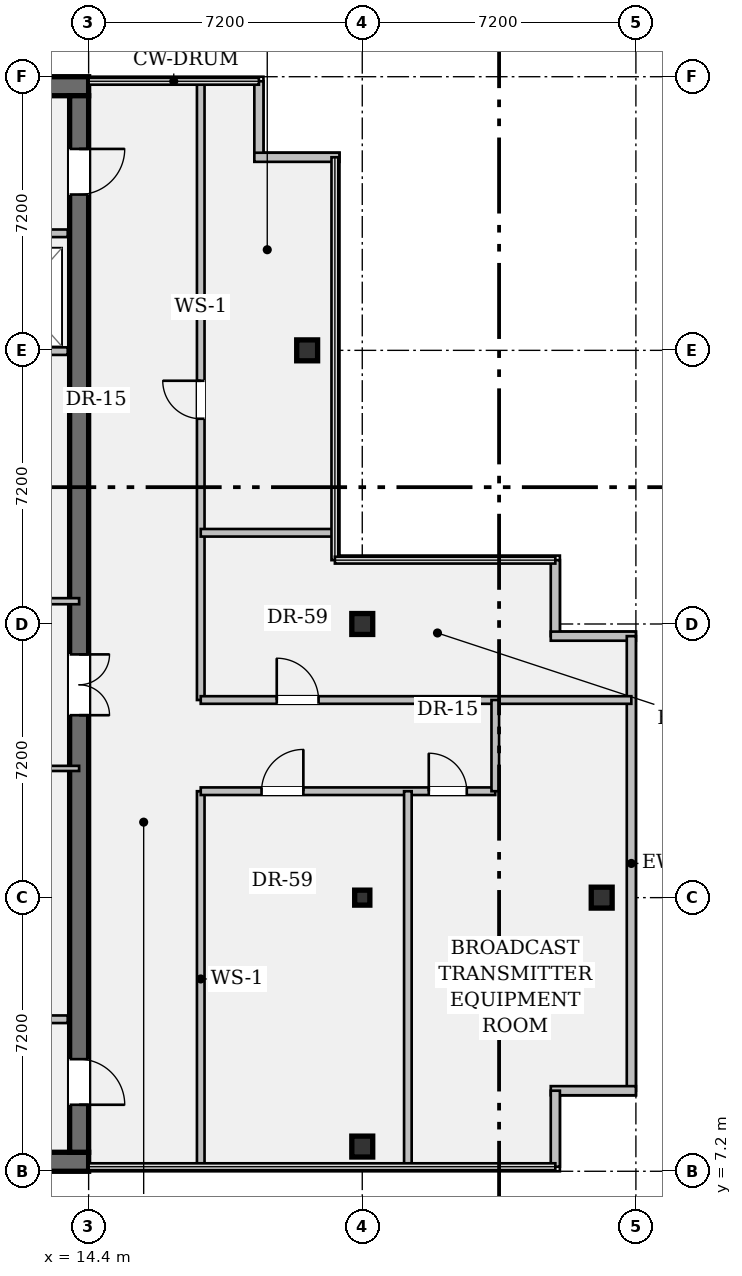
"""IFC4 building model, lengths in metres.
Left out: names, types, materials, properties, quantities, classifications, styles, units other than length and angle.
Written with IfcOpenShell. Run it as: python <this file> out.ifc"""

import sys

from ifc_helpers import new_model, si_unit, direction, frame, frame_2d, origin, origin_2d, place, context, subcontext, project, spatial, rectangle, hollow_rectangle, i_section, extrude, element, fill, save


model = new_model("IFC4")
c1 = context("Model", 3, precision=1e-05, world=origin(), true_north=direction((0.0, 1.0)))
c2 = subcontext(c1, "Body", "Model", "MODEL_VIEW")
j1 = project(units=[si_unit("LENGTHUNIT", "METRE"), si_unit("PLANEANGLEUNIT", "RADIAN")], contexts=[c1])
p1 = place(None, origin())
s1 = spatial("IfcSite", under=j1, at=p1, CompositionType="ELEMENT")
p2 = place(p1, origin())
s2 = spatial("IfcBuilding", under=s1, at=p2, CompositionType="ELEMENT")
p3 = place(p2, frame((0.0, 0.0, 301.35)))
s3 = spatial("IfcBuildingStorey", under=s2, at=p3, CompositionType="ELEMENT", Elevation=301.35)
for number, where, z_axis, x_axis in (
    (1, (0.5, 7.45, 0.0), (0.0, 0.0, 1.0), (1.0, 0.0, 0.0)),
    (2, (0.5, 35.75, 0.0), (0.0, 0.0, 1.0), (1.0, 0.0, 0.0)),
):
    element("IfcWall", number, at=place(p3, frame(where, z_axis=z_axis, x_axis=x_axis)), inside=s3, PredefinedType="SHEAR", context=c2, shape_type="SweptSolid", body=[
        extrude(rectangle(XDim=13.9, YDim=0.5, at=frame_2d((6.95, 0.0))), origin(), (0.0, 0.0, 1.0), 3.5),
    ])
p4 = place(p3, frame((14.15, 35.5, 0.0), z_axis=(0.0, 0.0, 1.0), x_axis=(0.0, -1.0, 0.0)))
e3 = element("IfcWall", 3, at=p4, inside=s3, PredefinedType="SHEAR", context=c2, shape_type="SweptSolid", body=[
    extrude(rectangle(XDim=27.8, YDim=0.5, at=frame_2d((13.9, 0.0))), origin(), (0.0, 0.0, 1.0), 3.5),
])
p5 = place(p4, frame((1.4, 0.0, 0.0)))
e4 = element("IfcOpeningElement", 4, at=p5, cuts=e3, PredefinedType="OPENING", context=c2, shape_type="SweptSolid", body=[
    extrude(rectangle(XDim=1.2, YDim=2.15, at=frame_2d((0.6, 1.075))), frame((0.0, 0.262, 0.0), z_axis=(0.0, -1.0, 0.0), x_axis=(1.0, 0.0, 0.0)), (0.0, 0.0, 1.0), 0.524),
])
p6 = place(p4, frame((25.35, 0.0, 0.0)))
e5 = element("IfcOpeningElement", 5, at=p6, cuts=e3, PredefinedType="OPENING", context=c2, shape_type="SweptSolid", body=[
    extrude(rectangle(XDim=1.2, YDim=2.15, at=frame_2d((0.6, 1.075))), frame((0.0, 0.262, 0.0), z_axis=(0.0, -1.0, 0.0), x_axis=(1.0, 0.0, 0.0)), (0.0, 0.0, 1.0), 0.524),
])
p7 = place(p4, frame((14.7, 0.0, 0.0)))
e6 = element("IfcOpeningElement", 6, at=p7, cuts=e3, PredefinedType="OPENING", context=c2, shape_type="SweptSolid", body=[
    extrude(rectangle(XDim=1.6, YDim=2.2, at=frame_2d((0.8, 1.1))), frame((0.0, 0.262, 0.0), z_axis=(0.0, -1.0, 0.0), x_axis=(1.0, 0.0, 0.0)), (0.0, 0.0, 1.0), 0.524),
])
for number, where, z_axis, x_axis in (
    (7, (20.15, 28.8, 0.0), (0.0, 0.0, 1.0), (1.0, 0.0, 0.0)),
    (8, (21.6, 7.85, 0.0), (0.0, 0.0, 1.0), (1.0, 0.0, 0.0)),
):
    element("IfcColumn", number, at=place(p3, frame(where, z_axis=z_axis, x_axis=x_axis)), inside=s3, PredefinedType="COLUMN", context=c2, shape_type="SweptSolid", body=[
        extrude(hollow_rectangle(XDim=0.55, YDim=0.55, WallThickness=0.035, at=origin_2d()), origin(), (0.0, 0.0, 1.0), 3.5),
    ])
p8 = place(p3, frame((21.6, 14.4, 0.0), z_axis=(0.0, 0.0, 1.0), x_axis=(1.0, 0.0, 0.0)))
e9 = element("IfcColumn", 9, at=p8, inside=s3, PredefinedType="COLUMN", context=c2, shape_type="SweptSolid", body=[
    extrude(i_section(OverallWidth=0.399, OverallDepth=0.394, WebThickness=0.023, FlangeThickness=0.037, FilletRadius=0.018, at=origin_2d()), origin(), (0.0, 0.0, 1.0), 3.5),
])
for number, where, z_axis, x_axis in (
    (10, (21.6, 21.6, 0.0), (0.0, 0.0, 1.0), (1.0, 0.0, 0.0)),
    (11, (27.9, 14.4, 0.0), (0.0, 0.0, 1.0), (1.0, 0.0, 0.0)),
):
    element("IfcColumn", number, at=place(p3, frame(where, z_axis=z_axis, x_axis=x_axis)), inside=s3, PredefinedType="COLUMN", context=c2, shape_type="SweptSolid", body=[
        extrude(hollow_rectangle(XDim=0.55, YDim=0.55, WallThickness=0.035, at=origin_2d()), origin(), (0.0, 0.0, 1.0), 3.5),
    ])
p9 = place(p3, frame((18.88, 35.88, 0.0), z_axis=(0.0, 0.0, 1.0), x_axis=(0.0, -1.0, 0.0)))
e12 = element("IfcWall", 12, at=p9, inside=s3, PredefinedType="STANDARD", context=c2, shape_type="SweptSolid", body=[
    extrude(rectangle(XDim=2.0, YDim=0.24, at=frame_2d((1.0, 0.0))), origin(), (0.0, 0.0, 1.0), 3.5),
])
p10 = place(p3, frame((18.76, 33.88, 0.0), z_axis=(0.0, 0.0, 1.0), x_axis=(1.0, 0.0, 0.0)))
e13 = element("IfcWall", 13, at=p10, inside=s3, PredefinedType="STANDARD", context=c2, shape_type="SweptSolid", body=[
    extrude(rectangle(XDim=2.24, YDim=0.24, at=frame_2d((1.12, 0.0))), origin(), (0.0, 0.0, 1.0), 3.5),
])
p11 = place(p3, frame((26.68, 23.28, 0.0), z_axis=(0.0, 0.0, 1.0), x_axis=(0.0, -1.0, 0.0)))
e14 = element("IfcWall", 14, at=p11, inside=s3, PredefinedType="STANDARD", context=c2, shape_type="SweptSolid", body=[
    extrude(rectangle(XDim=2.0, YDim=0.24, at=frame_2d((1.0, 0.0))), origin(), (0.0, 0.0, 1.0), 3.5),
])
p12 = place(p3, frame((26.56, 21.28, 0.0), z_axis=(0.0, 0.0, 1.0), x_axis=(1.0, 0.0, 0.0)))
e15 = element("IfcWall", 15, at=p12, inside=s3, PredefinedType="STANDARD", context=c2, shape_type="SweptSolid", body=[
    extrude(rectangle(XDim=2.24, YDim=0.24, at=frame_2d((1.12, 0.0))), origin(), (0.0, 0.0, 1.0), 3.5),
])
p13 = place(p3, frame((28.68, 21.28, 0.0), z_axis=(0.0, 0.0, 1.0), x_axis=(0.0, -1.0, 0.0)))
e16 = element("IfcWall", 16, at=p13, inside=s3, PredefinedType="STANDARD", context=c2, shape_type="SweptSolid", body=[
    extrude(rectangle(XDim=11.96, YDim=0.24, at=frame_2d((5.98, 0.0))), origin(), (0.0, 0.0, 1.0), 3.5),
])
p14 = place(p3, frame((28.8, 9.32, 0.0), z_axis=(0.0, 0.0, 1.0), x_axis=(-1.0, 0.0, 0.0)))
e17 = element("IfcWall", 17, at=p14, inside=s3, PredefinedType="STANDARD", context=c2, shape_type="SweptSolid", body=[
    extrude(rectangle(XDim=2.24, YDim=0.24, at=frame_2d((1.12, 0.0))), origin(), (0.0, 0.0, 1.0), 3.5),
])
p15 = place(p3, frame((26.68, 9.32, 0.0), z_axis=(0.0, 0.0, 1.0), x_axis=(0.0, -1.0, 0.0)))
e18 = element("IfcWall", 18, at=p15, inside=s3, PredefinedType="STANDARD", context=c2, shape_type="SweptSolid", body=[
    extrude(rectangle(XDim=2.0, YDim=0.24, at=frame_2d((1.0, 0.0))), origin(), (0.0, 0.0, 1.0), 3.5),
])
p16 = place(p3, frame((8.7, 31.88, 0.0), z_axis=(0.0, 0.0, 1.0), x_axis=(1.0, 0.0, 0.0)))
e19 = element("IfcWall", 19, at=p16, inside=s3, PredefinedType="PARTITIONING", context=c2, shape_type="SweptSolid", body=[
    extrude(rectangle(XDim=5.15, YDim=0.2, at=frame_2d((2.575, 0.0))), origin(), (0.0, 0.0, 1.0), 3.5),
])
p17 = place(p16, frame((0.75, 0.0, 0.0)))
e20 = element("IfcOpeningElement", 20, at=p17, cuts=e19, PredefinedType="OPENING", context=c2, shape_type="SweptSolid", body=[
    extrude(rectangle(XDim=1.2, YDim=2.2, at=frame_2d((0.6, 1.1))), frame((0.0, 0.112, 0.0), z_axis=(0.0, -1.0, 0.0), x_axis=(1.0, 0.0, 0.0)), (0.0, 0.0, 1.0), 0.224),
])
p18 = place(p16, frame((3.25, 0.0, 0.0)))
e21 = element("IfcOpeningElement", 21, at=p18, cuts=e19, PredefinedType="OPENING", context=c2, shape_type="SweptSolid", body=[
    extrude(rectangle(XDim=1.2, YDim=2.2, at=frame_2d((0.6, 1.1))), frame((0.0, 0.112, 0.0), z_axis=(0.0, -1.0, 0.0), x_axis=(1.0, 0.0, 0.0)), (0.0, 0.0, 1.0), 0.224),
])
for number, where, z_axis, x_axis in (
    (22, (8.7, 11.2, 0.0), (0.0, 0.0, 1.0), (1.0, 0.0, 0.0)),
    (23, (8.7, 28.78, 0.0), (0.0, 0.0, 1.0), (1.0, 0.0, 0.0)),
):
    element("IfcWall", number, at=place(p3, frame(where, z_axis=z_axis, x_axis=x_axis)), inside=s3, PredefinedType="PARTITIONING", context=c2, shape_type="SweptSolid", body=[
        extrude(rectangle(XDim=5.15, YDim=0.2, at=frame_2d((2.575, 0.0))), origin(), (0.0, 0.0, 1.0), 3.5),
    ])
p19 = place(p3, frame((7.1, 22.2, 0.0), z_axis=(0.0, 0.0, 1.0), x_axis=(1.0, 0.0, 0.0)))
e24 = element("IfcWall", 24, at=p19, inside=s3, PredefinedType="PARTITIONING", context=c2, shape_type="SweptSolid", body=[
    extrude(rectangle(XDim=7.05, YDim=0.16, at=frame_2d((3.525, 0.0))), origin(), (0.0, 0.0, 1.0), 3.5),
])
p20 = place(p19, frame((1.1, 0.0, 0.0)))
e25 = element("IfcOpeningElement", 25, at=p20, cuts=e24, PredefinedType="OPENING", context=c2, shape_type="SweptSolid", body=[
    extrude(rectangle(XDim=0.92, YDim=2.15, at=frame_2d((0.46, 1.075))), frame((0.0, 0.092, 0.0), z_axis=(0.0, -1.0, 0.0), x_axis=(1.0, 0.0, 0.0)), (0.0, 0.0, 1.0), 0.184),
])
p21 = place(p19, frame((4.4, 0.0, 0.0)))
e26 = element("IfcOpeningElement", 26, at=p21, cuts=e24, PredefinedType="OPENING", context=c2, shape_type="SweptSolid", body=[
    extrude(rectangle(XDim=0.92, YDim=2.15, at=frame_2d((0.46, 1.075))), frame((0.0, 0.092, 0.0), z_axis=(0.0, -1.0, 0.0), x_axis=(1.0, 0.0, 0.0)), (0.0, 0.0, 1.0), 0.184),
])
p22 = place(p3, frame((5.15, 17.8, 0.0), z_axis=(0.0, 0.0, 1.0), x_axis=(1.0, 0.0, 0.0)))
e27 = element("IfcWall", 27, at=p22, inside=s3, PredefinedType="PARTITIONING", context=c2, shape_type="SweptSolid", body=[
    extrude(rectangle(XDim=9.0, YDim=0.135, at=frame_2d((4.5, 0.0))), origin(), (0.0, 0.0, 1.0), 3.5),
])
p23 = place(p22, frame((4.35, 0.0, 0.0)))
e28 = element("IfcOpeningElement", 28, at=p23, cuts=e27, PredefinedType="OPENING", context=c2, shape_type="SweptSolid", body=[
    extrude(rectangle(XDim=1.0, YDim=2.15, at=frame_2d((0.5, 1.075))), frame((0.0, 0.08, 0.0), z_axis=(0.0, -1.0, 0.0), x_axis=(1.0, 0.0, 0.0)), (0.0, 0.0, 1.0), 0.159),
])
p24 = place(p3, frame((17.35, 7.32, 0.0), z_axis=(0.0, 0.0, 1.0), x_axis=(0.0, 1.0, 0.0)))
e29 = element("IfcWall", 29, at=p24, inside=s3, PredefinedType="PARTITIONING", context=c2, shape_type="SweptSolid", body=[
    extrude(rectangle(XDim=9.88, YDim=0.2, at=frame_2d((4.94, 0.0))), origin(), (0.0, 0.0, 1.0), 2.936),
])
p25 = place(p3, frame((17.35, 19.6, 0.0), z_axis=(0.0, 0.0, 1.0), x_axis=(0.0, 1.0, 0.0)))
e30 = element("IfcWall", 30, at=p25, inside=s3, PredefinedType="PARTITIONING", context=c2, shape_type="SweptSolid", body=[
    extrude(rectangle(XDim=16.28, YDim=0.2, at=frame_2d((8.14, 0.0))), origin(), (0.0, 0.0, 1.0), 2.936),
])
p26 = place(p25, frame((7.4, 0.0, 0.0)))
e31 = element("IfcOpeningElement", 31, at=p26, cuts=e30, PredefinedType="OPENING", context=c2, shape_type="SweptSolid", body=[
    extrude(rectangle(XDim=1.0, YDim=2.15, at=frame_2d((0.5, 1.075))), frame((0.0, 0.112, 0.0), z_axis=(0.0, -1.0, 0.0), x_axis=(1.0, 0.0, 0.0)), (0.0, 0.0, 1.0), 0.224),
])
p27 = place(p3, frame((17.35, 17.2, 0.0), z_axis=(0.0, 0.0, 1.0), x_axis=(1.0, 0.0, 0.0)))
e32 = element("IfcWall", 32, at=p27, inside=s3, PredefinedType="PARTITIONING", context=c2, shape_type="SweptSolid", body=[
    extrude(rectangle(XDim=7.75, YDim=0.2, at=frame_2d((3.875, 0.0))), origin(), (0.0, 0.0, 1.0), 2.936),
])
p28 = place(p27, frame((1.6, 0.0, 0.0)))
e33 = element("IfcOpeningElement", 33, at=p28, cuts=e32, PredefinedType="OPENING", context=c2, shape_type="SweptSolid", body=[
    extrude(rectangle(XDim=1.1, YDim=2.15, at=frame_2d((0.55, 1.075))), frame((0.0, 0.112, 0.0), z_axis=(0.0, -1.0, 0.0), x_axis=(1.0, 0.0, 0.0)), (0.0, 0.0, 1.0), 0.224),
])
p29 = place(p27, frame((6.0, 0.0, 0.0)))
e34 = element("IfcOpeningElement", 34, at=p29, cuts=e32, PredefinedType="OPENING", context=c2, shape_type="SweptSolid", body=[
    extrude(rectangle(XDim=1.0, YDim=2.15, at=frame_2d((0.5, 1.075))), frame((0.0, 0.112, 0.0), z_axis=(0.0, -1.0, 0.0), x_axis=(1.0, 0.0, 0.0)), (0.0, 0.0, 1.0), 0.224),
])
p30 = place(p3, frame((17.35, 19.6, 0.0), z_axis=(0.0, 0.0, 1.0), x_axis=(1.0, 0.0, 0.0)))
e35 = element("IfcWall", 35, at=p30, inside=s3, PredefinedType="PARTITIONING", context=c2, shape_type="SweptSolid", body=[
    extrude(rectangle(XDim=11.33, YDim=0.2, at=frame_2d((5.665, 0.0))), origin(), (0.0, 0.0, 1.0), 2.936),
])
p31 = place(p30, frame((2.0, 0.0, 0.0)))
e36 = element("IfcOpeningElement", 36, at=p31, cuts=e35, PredefinedType="OPENING", context=c2, shape_type="SweptSolid", body=[
    extrude(rectangle(XDim=1.1, YDim=2.15, at=frame_2d((0.55, 1.075))), frame((0.0, 0.112, 0.0), z_axis=(0.0, -1.0, 0.0), x_axis=(1.0, 0.0, 0.0)), (0.0, 0.0, 1.0), 0.224),
])
p32 = place(p3, frame((17.35, 24.0, 0.0), z_axis=(0.0, 0.0, 1.0), x_axis=(1.0, 0.0, 0.0)))
e37 = element("IfcWall", 37, at=p32, inside=s3, PredefinedType="PARTITIONING", context=c2, shape_type="SweptSolid", body=[
    extrude(rectangle(XDim=3.53, YDim=0.2, at=frame_2d((1.765, 0.0))), origin(), (0.0, 0.0, 1.0), 3.175),
])
p33 = place(p3, frame((22.8, 7.32, 0.0), z_axis=(0.0, 0.0, 1.0), x_axis=(0.0, 1.0, 0.0)))
e38 = element("IfcWall", 38, at=p33, inside=s3, PredefinedType="PARTITIONING", context=c2, shape_type="SweptSolid", body=[
    extrude(rectangle(XDim=9.88, YDim=0.2, at=frame_2d((4.94, 0.0))), origin(), (0.0, 0.0, 1.0), 2.936),
])
p34 = place(p3, frame((25.1, 17.2, 0.0), z_axis=(0.0, 0.0, 1.0), x_axis=(0.0, 1.0, 0.0)))
e39 = element("IfcWall", 39, at=p34, inside=s3, PredefinedType="PARTITIONING", context=c2, shape_type="SweptSolid", body=[
    extrude(rectangle(XDim=2.4, YDim=0.2, at=frame_2d((1.2, 0.0))), origin(), (0.0, 0.0, 1.0), 3.5),
])
p35 = place(p5, origin())
e40 = element("IfcDoor", 40, at=p35, inside=s3, OperationType="SINGLE_SWING_LEFT", PredefinedType="DOOR", context=c2, shape_type="SweptSolid", body=[
    extrude(rectangle(XDim=1.2, YDim=2.15, at=frame_2d((0.6, 1.075))), frame((0.0, 0.025, 0.0), z_axis=(0.0, -1.0, 0.0), x_axis=(1.0, 0.0, 0.0)), (0.0, 0.0, 1.0), 0.05),
])
fill(e4, e40)
p36 = place(p6, origin())
e41 = element("IfcDoor", 41, at=p36, inside=s3, OperationType="SINGLE_SWING_RIGHT", PredefinedType="DOOR", context=c2, shape_type="SweptSolid", body=[
    extrude(rectangle(XDim=1.2, YDim=2.15, at=frame_2d((0.6, 1.075))), frame((0.0, 0.025, 0.0), z_axis=(0.0, -1.0, 0.0), x_axis=(1.0, 0.0, 0.0)), (0.0, 0.0, 1.0), 0.05),
])
fill(e5, e41)
p37 = place(p7, origin())
e42 = element("IfcDoor", 42, at=p37, inside=s3, OperationType="DOUBLE_DOOR_SINGLE_SWING", PredefinedType="DOOR", context=c2, shape_type="SweptSolid", body=[
    extrude(rectangle(XDim=1.6, YDim=2.2, at=frame_2d((0.8, 1.1))), frame((0.0, 0.025, 0.0), z_axis=(0.0, -1.0, 0.0), x_axis=(1.0, 0.0, 0.0)), (0.0, 0.0, 1.0), 0.05),
])
fill(e6, e42)
p38 = place(p26, origin())
e43 = element("IfcDoor", 43, at=p38, inside=s3, OperationType="SINGLE_SWING_RIGHT", PredefinedType="DOOR", context=c2, shape_type="SweptSolid", body=[
    extrude(rectangle(XDim=1.0, YDim=2.15, at=frame_2d((0.5, 1.075))), frame((0.0, 0.025, 0.0), z_axis=(0.0, -1.0, 0.0), x_axis=(1.0, 0.0, 0.0)), (0.0, 0.0, 1.0), 0.05),
])
fill(e31, e43)
p39 = place(p31, origin())
e44 = element("IfcDoor", 44, at=p39, inside=s3, OperationType="SINGLE_SWING_LEFT", PredefinedType="DOOR", context=c2, shape_type="SweptSolid", body=[
    extrude(rectangle(XDim=1.1, YDim=2.15, at=frame_2d((0.55, 1.075))), frame((0.0, 0.025, 0.0), z_axis=(0.0, -1.0, 0.0), x_axis=(1.0, 0.0, 0.0)), (0.0, 0.0, 1.0), 0.05),
])
fill(e36, e44)
p40 = place(p28, origin())
e45 = element("IfcDoor", 45, at=p40, inside=s3, OperationType="SINGLE_SWING_RIGHT", PredefinedType="DOOR", context=c2, shape_type="SweptSolid", body=[
    extrude(rectangle(XDim=1.1, YDim=2.15, at=frame_2d((0.55, 1.075))), frame((0.0, 0.025, 0.0), z_axis=(0.0, -1.0, 0.0), x_axis=(1.0, 0.0, 0.0)), (0.0, 0.0, 1.0), 0.05),
])
fill(e33, e45)
p41 = place(p29, origin())
e46 = element("IfcDoor", 46, at=p41, inside=s3, OperationType="SINGLE_SWING_LEFT", PredefinedType="DOOR", context=c2, shape_type="SweptSolid", body=[
    extrude(rectangle(XDim=1.0, YDim=2.15, at=frame_2d((0.5, 1.075))), frame((0.0, 0.025, 0.0), z_axis=(0.0, -1.0, 0.0), x_axis=(1.0, 0.0, 0.0)), (0.0, 0.0, 1.0), 0.05),
])
fill(e34, e46)
save(model, sys.argv[1])
